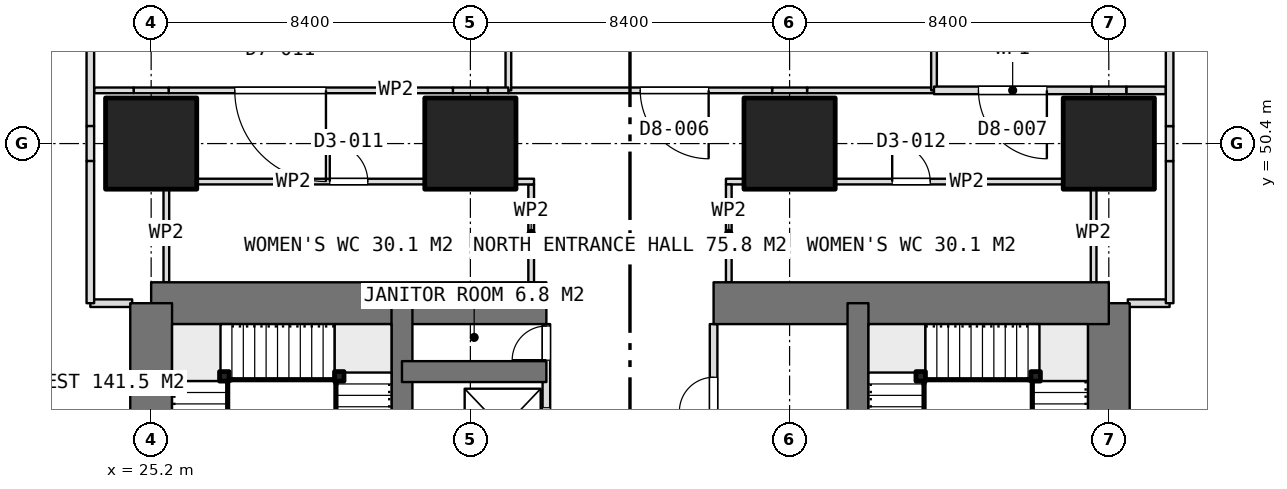
"""IFC4 building model, lengths in metres.
Left out: names, types, materials, properties, quantities, classifications, styles, units other than length and angle.
Written with IfcOpenShell. Run it as: python <this file> out.ifc"""

import sys

from ifc_helpers import new_model, si_unit, direction, frame, frame_2d, origin, origin_2d, place, context, subcontext, project, spatial, rectangle, extrude, element, fill, save


model = new_model("IFC4")
c1 = context("Model", 3, precision=1e-05, world=origin(), true_north=direction((0.0, 1.0)))
c2 = subcontext(c1, "Body", "Model", "MODEL_VIEW")
j1 = project(units=[si_unit("LENGTHUNIT", "METRE"), si_unit("PLANEANGLEUNIT", "RADIAN")], contexts=[c1])
p1 = place(None, origin())
s1 = spatial("IfcSite", under=j1, at=p1, CompositionType="ELEMENT")
p2 = place(p1, origin())
s2 = spatial("IfcBuilding", under=s1, at=p2, CompositionType="ELEMENT")
p3 = place(p2, origin())
s3 = spatial("IfcBuildingStorey", under=s2, at=p3, CompositionType="ELEMENT", Elevation=0.0)
p4 = place(p3, frame((25.2, 46.2, 0.0), z_axis=(0.0, 0.0, 1.0), x_axis=(1.0, 0.0, 0.0)))
e1 = element("IfcWall", 1, at=p4, inside=s3, PredefinedType="SHEAR", context=c2, shape_type="SweptSolid", body=[
    extrude(rectangle(XDim=10.4, YDim=1.1, at=frame_2d((5.2, 0.0))), origin(), (0.0, 0.0, 1.0), 5.4),
])
p5 = place(p3, frame((40.0, 46.2, 0.0), z_axis=(0.0, 0.0, 1.0), x_axis=(1.0, 0.0, 0.0)))
e2 = element("IfcWall", 2, at=p5, inside=s3, PredefinedType="SHEAR", context=c2, shape_type="SweptSolid", body=[
    extrude(rectangle(XDim=10.4, YDim=1.1, at=frame_2d((5.2, 0.0))), origin(), (0.0, 0.0, 1.0), 5.4),
])
p6 = place(p3, frame((25.2, 21.0, 0.0), z_axis=(0.0, 0.0, 1.0), x_axis=(0.0, 1.0, 0.0)))
e3 = element("IfcWall", 3, at=p6, inside=s3, PredefinedType="SHEAR", context=c2, shape_type="SweptSolid", body=[
    extrude(rectangle(XDim=25.2, YDim=1.1, at=frame_2d((12.6, 0.0))), origin(), (0.0, 0.0, 1.0), 5.4),
])
p7 = place(p6, frame((7.8, 0.0, 0.0)))
e4 = element("IfcOpeningElement", 4, at=p7, cuts=e3, PredefinedType="OPENING", context=c2, shape_type="SweptSolid", body=[
    extrude(rectangle(XDim=1.2, YDim=2.1, at=frame_2d((0.6, 1.05))), frame((0.0, 0.56, 0.0), z_axis=(0.0, -1.0, 0.0), x_axis=(1.0, 0.0, 0.0)), (0.0, 0.0, 1.0), 1.12),
])
p8 = place(p6, frame((14.25, 0.0, 0.0)))
e5 = element("IfcOpeningElement", 5, at=p8, cuts=e3, PredefinedType="OPENING", context=c2, shape_type="SweptSolid", body=[
    extrude(rectangle(XDim=0.9, YDim=2.1, at=frame_2d((0.45, 1.05))), frame((0.0, 0.56, 0.0), z_axis=(0.0, -1.0, 0.0), x_axis=(1.0, 0.0, 0.0)), (0.0, 0.0, 1.0), 1.12),
])
p9 = place(p6, frame((16.85, 0.0, 0.0)))
e6 = element("IfcOpeningElement", 6, at=p9, cuts=e3, PredefinedType="OPENING", context=c2, shape_type="SweptSolid", body=[
    extrude(rectangle(XDim=0.9, YDim=2.1, at=frame_2d((0.45, 1.05))), frame((0.0, 0.56, 0.0), z_axis=(0.0, -1.0, 0.0), x_axis=(1.0, 0.0, 0.0)), (0.0, 0.0, 1.0), 1.12),
])
p10 = place(p6, frame((19.075, 0.0, 0.0)))
e7 = element("IfcOpeningElement", 7, at=p10, cuts=e3, PredefinedType="OPENING", context=c2, shape_type="SweptSolid", body=[
    extrude(rectangle(XDim=1.2, YDim=2.1, at=frame_2d((0.6, 1.05))), frame((0.0, 0.56, 0.0), z_axis=(0.0, -1.0, 0.0), x_axis=(1.0, 0.0, 0.0)), (0.0, 0.0, 1.0), 1.12),
])
p11 = place(p3, frame((50.4, 21.0, 0.0), z_axis=(0.0, 0.0, 1.0), x_axis=(0.0, 1.0, 0.0)))
e8 = element("IfcWall", 8, at=p11, inside=s3, PredefinedType="SHEAR", context=c2, shape_type="SweptSolid", body=[
    extrude(rectangle(XDim=25.2, YDim=1.1, at=frame_2d((12.6, 0.0))), origin(), (0.0, 0.0, 1.0), 5.4),
])
p12 = place(p11, frame((16.2, 0.0, 0.0)))
e9 = element("IfcOpeningElement", 9, at=p12, cuts=e8, PredefinedType="OPENING", context=c2, shape_type="SweptSolid", body=[
    extrude(rectangle(XDim=1.2, YDim=2.1, at=frame_2d((0.6, 1.05))), frame((0.0, 0.56, 0.0), z_axis=(0.0, -1.0, 0.0), x_axis=(1.0, 0.0, 0.0)), (0.0, 0.0, 1.0), 1.12),
])
p13 = place(p11, frame((10.05, 0.0, 0.0)))
e10 = element("IfcOpeningElement", 10, at=p13, cuts=e8, PredefinedType="OPENING", context=c2, shape_type="SweptSolid", body=[
    extrude(rectangle(XDim=0.9, YDim=2.1, at=frame_2d((0.45, 1.05))), frame((0.0, 0.56, 0.0), z_axis=(0.0, -1.0, 0.0), x_axis=(1.0, 0.0, 0.0)), (0.0, 0.0, 1.0), 1.12),
])
p14 = place(p11, frame((7.45, 0.0, 0.0)))
e11 = element("IfcOpeningElement", 11, at=p14, cuts=e8, PredefinedType="OPENING", context=c2, shape_type="SweptSolid", body=[
    extrude(rectangle(XDim=0.9, YDim=2.1, at=frame_2d((0.45, 1.05))), frame((0.0, 0.56, 0.0), z_axis=(0.0, -1.0, 0.0), x_axis=(1.0, 0.0, 0.0)), (0.0, 0.0, 1.0), 1.12),
])
p15 = place(p11, frame((0.75, 0.0, 0.0)))
e12 = element("IfcOpeningElement", 12, at=p15, cuts=e8, PredefinedType="OPENING", context=c2, shape_type="SweptSolid", body=[
    extrude(rectangle(XDim=1.2, YDim=2.1, at=frame_2d((0.6, 1.05))), frame((0.0, 0.56, 0.0), z_axis=(0.0, -1.0, 0.0), x_axis=(1.0, 0.0, 0.0)), (0.0, 0.0, 1.0), 1.12),
])
for number, where, z_axis, x_axis in (
    (13, (31.8, 21.0, 0.0), (0.0, 0.0, 1.0), (0.0, 1.0, 0.0)),
    (14, (43.8, 21.0, 0.0), (0.0, 0.0, 1.0), (0.0, 1.0, 0.0)),
):
    element("IfcWall", number, at=place(p3, frame(where, z_axis=z_axis, x_axis=x_axis)), inside=s3, PredefinedType="SHEAR", context=c2, shape_type="SweptSolid", body=[
        extrude(rectangle(XDim=25.2, YDim=0.55, at=frame_2d((12.6, 0.0))), origin(), (0.0, 0.0, 1.0), 5.4),
    ])
p16 = place(p3, frame((31.8, 44.4, 0.0), z_axis=(0.0, 0.0, 1.0), x_axis=(1.0, 0.0, 0.0)))
e15 = element("IfcWall", 15, at=p16, inside=s3, PredefinedType="SHEAR", context=c2, shape_type="SweptSolid", body=[
    extrude(rectangle(XDim=3.8, YDim=0.55, at=frame_2d((1.9, 0.0))), origin(), (0.0, 0.0, 1.0), 5.4),
])
for number, where, z_axis, x_axis in (
    (16, (25.2, 50.4, 0.0), (0.0, 0.0, 1.0), (1.0, 0.0, 0.0)),
    (17, (33.6, 50.4, 0.0), (0.0, 0.0, 1.0), (1.0, 0.0, 0.0)),
    (18, (42.0, 50.4, 0.0), (0.0, 0.0, 1.0), (1.0, 0.0, 0.0)),
    (19, (50.4, 50.4, 0.0), (0.0, 0.0, 1.0), (1.0, 0.0, 0.0)),
):
    element("IfcColumn", number, at=place(p3, frame(where, z_axis=z_axis, x_axis=x_axis)), inside=s3, PredefinedType="COLUMN", context=c2, shape_type="SweptSolid", body=[
        extrude(rectangle(XDim=2.4, YDim=2.4, at=origin_2d()), origin(), (0.0, 0.0, 1.0), 5.4),
    ])
p17 = place(p3, frame((40.0, 41.675, 0.0), z_axis=(0.0, 0.0, 1.0), x_axis=(0.0, 1.0, 0.0)))
e20 = element("IfcWall", 20, at=p17, inside=s3, PredefinedType="PARTITIONING", context=c2, shape_type="SweptSolid", body=[
    extrude(rectangle(XDim=3.975, YDim=0.2, at=frame_2d((1.987, 0.0))), origin(), (0.0, 0.0, 1.0), 5.1),
])
p18 = place(p17, frame((1.675, 0.0, 0.0)))
e21 = element("IfcOpeningElement", 21, at=p18, cuts=e20, PredefinedType="OPENING", context=c2, shape_type="SweptSolid", body=[
    extrude(rectangle(XDim=0.9, YDim=2.1, at=frame_2d((0.45, 1.05))), frame((0.0, 0.11, 0.0), z_axis=(0.0, -1.0, 0.0), x_axis=(1.0, 0.0, 0.0)), (0.0, 0.0, 1.0), 0.22),
])
p19 = place(p3, frame((35.6, 41.675, 0.0), z_axis=(0.0, 0.0, 1.0), x_axis=(0.0, 1.0, 0.0)))
e22 = element("IfcWall", 22, at=p19, inside=s3, PredefinedType="PARTITIONING", context=c2, shape_type="SweptSolid", body=[
    extrude(rectangle(XDim=3.975, YDim=0.2, at=frame_2d((1.987, 0.0))), origin(), (0.0, 0.0, 1.0), 5.1),
])
p20 = place(p19, frame((3.025, 0.0, 0.0)))
e23 = element("IfcOpeningElement", 23, at=p20, cuts=e22, PredefinedType="OPENING", context=c2, shape_type="SweptSolid", body=[
    extrude(rectangle(XDim=0.9, YDim=2.1, at=frame_2d((0.45, 1.05))), frame((0.0, 0.11, 0.0), z_axis=(0.0, -1.0, 0.0), x_axis=(1.0, 0.0, 0.0)), (0.0, 0.0, 1.0), 0.22),
])
p21 = place(p19, frame((0.675, 0.0, 0.0)))
e24 = element("IfcOpeningElement", 24, at=p21, cuts=e22, PredefinedType="OPENING", context=c2, shape_type="SweptSolid", body=[
    extrude(rectangle(XDim=1.1, YDim=2.1, at=frame_2d((0.55, 1.05))), frame((0.0, 0.11, 0.0), z_axis=(0.0, -1.0, 0.0), x_axis=(1.0, 0.0, 0.0)), (0.0, 0.0, 1.0), 0.22),
])
p22 = place(p3, frame((40.325, 49.4, 0.0), z_axis=(0.0, 0.0, 1.0), x_axis=(1.0, 0.0, 0.0)))
e25 = element("IfcWall", 25, at=p22, inside=s3, PredefinedType="PARTITIONING", context=c2, shape_type="SweptSolid", body=[
    extrude(rectangle(XDim=9.75, YDim=0.15, at=frame_2d((4.875, 0.0))), origin(), (0.0, 0.0, 1.0), 5.1),
])
p23 = place(p22, frame((4.375, 0.0, 0.0)))
e26 = element("IfcOpeningElement", 26, at=p23, cuts=e25, PredefinedType="OPENING", context=c2, shape_type="SweptSolid", body=[
    extrude(rectangle(XDim=1.0, YDim=2.1, at=frame_2d((0.5, 1.05))), frame((0.0, 0.085, 0.0), z_axis=(0.0, -1.0, 0.0), x_axis=(1.0, 0.0, 0.0)), (0.0, 0.0, 1.0), 0.17),
])
for number, where, z_axis, x_axis in (
    (27, (40.4, 46.75, 0.0), (0.0, 0.0, 1.0), (0.0, 1.0, 0.0)),
    (28, (50.0, 46.75, 0.0), (0.0, 0.0, 1.0), (0.0, 1.0, 0.0)),
):
    element("IfcWall", number, at=place(p3, frame(where, z_axis=z_axis, x_axis=x_axis)), inside=s3, PredefinedType="PARTITIONING", context=c2, shape_type="SweptSolid", body=[
        extrude(rectangle(XDim=2.575, YDim=0.15, at=frame_2d((1.288, 0.0))), origin(), (0.0, 0.0, 1.0), 5.1),
    ])
p24 = place(p3, frame((25.525, 49.4, 0.0), z_axis=(0.0, 0.0, 1.0), x_axis=(1.0, 0.0, 0.0)))
e29 = element("IfcWall", 29, at=p24, inside=s3, PredefinedType="PARTITIONING", context=c2, shape_type="SweptSolid", body=[
    extrude(rectangle(XDim=9.75, YDim=0.15, at=frame_2d((4.875, 0.0))), origin(), (0.0, 0.0, 1.0), 5.1),
])
p25 = place(p24, frame((4.375, 0.0, 0.0)))
e30 = element("IfcOpeningElement", 30, at=p25, cuts=e29, PredefinedType="OPENING", context=c2, shape_type="SweptSolid", body=[
    extrude(rectangle(XDim=1.0, YDim=2.1, at=frame_2d((0.5, 1.05))), frame((0.0, 0.085, 0.0), z_axis=(0.0, -1.0, 0.0), x_axis=(1.0, 0.0, 0.0)), (0.0, 0.0, 1.0), 0.17),
])
for number, where, z_axis, x_axis in (
    (31, (25.6, 46.75, 0.0), (0.0, 0.0, 1.0), (0.0, 1.0, 0.0)),
    (32, (35.2, 46.75, 0.0), (0.0, 0.0, 1.0), (0.0, 1.0, 0.0)),
):
    element("IfcWall", number, at=place(p3, frame(where, z_axis=z_axis, x_axis=x_axis)), inside=s3, PredefinedType="PARTITIONING", context=c2, shape_type="SweptSolid", body=[
        extrude(rectangle(XDim=2.575, YDim=0.15, at=frame_2d((1.288, 0.0))), origin(), (0.0, 0.0, 1.0), 5.1),
    ])
p26 = place(p3, frame((23.6, 46.2, 0.0), z_axis=(0.0, 0.0, 1.0), x_axis=(1.0, 0.0, 0.0)))
e33 = element("IfcWall", 33, at=p26, inside=s3, PredefinedType="PARTITIONING", context=c2, shape_type="SweptSolid", body=[
    extrude(rectangle(XDim=1.1, YDim=0.2, at=frame_2d((0.55, 0.0))), origin(), (0.0, 0.0, 1.0), 5.1),
])
p27 = place(p3, frame((23.6, 58.34, 0.0), z_axis=(0.0, 0.0, 1.0), x_axis=(0.0, -1.0, 0.0)))
e34 = element("IfcWall", 34, at=p27, inside=s3, PredefinedType="PARTITIONING", context=c2, shape_type="SweptSolid", body=[
    extrude(rectangle(XDim=7.48, YDim=0.2, at=frame_2d((3.74, 0.0))), origin(), (0.0, 0.0, 1.0), 5.1),
])
p28 = place(p3, frame((23.6, 50.86, 0.0), z_axis=(0.0, 0.0, 1.0), x_axis=(0.0, -1.0, 0.0)))
e35 = element("IfcWall", 35, at=p28, inside=s3, PredefinedType="PARTITIONING", context=c2, shape_type="SweptSolid", body=[
    extrude(rectangle(XDim=0.92, YDim=0.2, at=frame_2d((0.46, 0.0))), origin(), (0.0, 0.0, 1.0), 3.3),
])
for number, where, z_axis, x_axis in (
    (36, (23.6, 49.94, 0.0), (0.0, 0.0, 1.0), (0.0, -1.0, 0.0)),
    (37, (52.0, 46.2, 0.0), (0.0, 0.0, 1.0), (0.0, 1.0, 0.0)),
):
    element("IfcWall", number, at=place(p3, frame(where, z_axis=z_axis, x_axis=x_axis)), inside=s3, PredefinedType="PARTITIONING", context=c2, shape_type="SweptSolid", body=[
        extrude(rectangle(XDim=3.74, YDim=0.2, at=frame_2d((1.87, 0.0))), origin(), (0.0, 0.0, 1.0), 5.1),
    ])
p29 = place(p3, frame((52.0, 49.94, 0.0), z_axis=(0.0, 0.0, 1.0), x_axis=(0.0, 1.0, 0.0)))
e38 = element("IfcWall", 38, at=p29, inside=s3, PredefinedType="PARTITIONING", context=c2, shape_type="SweptSolid", body=[
    extrude(rectangle(XDim=0.92, YDim=0.2, at=frame_2d((0.46, 0.0))), origin(), (0.0, 0.0, 1.0), 3.3),
])
p30 = place(p3, frame((52.0, 50.86, 0.0), z_axis=(0.0, 0.0, 1.0), x_axis=(0.0, 1.0, 0.0)))
e39 = element("IfcWall", 39, at=p30, inside=s3, PredefinedType="PARTITIONING", context=c2, shape_type="SweptSolid", body=[
    extrude(rectangle(XDim=7.48, YDim=0.2, at=frame_2d((3.74, 0.0))), origin(), (0.0, 0.0, 1.0), 5.1),
])
p31 = place(p3, frame((50.9, 46.2, 0.0), z_axis=(0.0, 0.0, 1.0), x_axis=(1.0, 0.0, 0.0)))
e40 = element("IfcWall", 40, at=p31, inside=s3, PredefinedType="PARTITIONING", context=c2, shape_type="SweptSolid", body=[
    extrude(rectangle(XDim=1.1, YDim=0.2, at=frame_2d((0.55, 0.0))), origin(), (0.0, 0.0, 1.0), 5.1),
])
p32 = place(p3, frame((45.8, 51.8, 0.0), z_axis=(0.0, 0.0, 1.0), x_axis=(-1.0, 0.0, 0.0)))
e41 = element("IfcWall", 41, at=p32, inside=s3, PredefinedType="PARTITIONING", context=c2, shape_type="SweptSolid", body=[
    extrude(rectangle(XDim=3.34, YDim=0.15, at=frame_2d((1.67, 0.0))), origin(), (0.0, 0.0, 1.0), 5.1),
])
p33 = place(p3, frame((42.46, 51.8, 0.0), z_axis=(0.0, 0.0, 1.0), x_axis=(-1.0, 0.0, 0.0)))
e42 = element("IfcWall", 42, at=p33, inside=s3, PredefinedType="PARTITIONING", context=c2, shape_type="SweptSolid", body=[
    extrude(rectangle(XDim=0.92, YDim=0.15, at=frame_2d((0.46, 0.0))), origin(), (0.0, 0.0, 1.0), 3.3),
])
p34 = place(p3, frame((41.54, 51.8, 0.0), z_axis=(0.0, 0.0, 1.0), x_axis=(-1.0, 0.0, 0.0)))
e43 = element("IfcWall", 43, at=p34, inside=s3, PredefinedType="PARTITIONING", context=c2, shape_type="SweptSolid", body=[
    extrude(rectangle(XDim=6.94, YDim=0.15, at=frame_2d((3.47, 0.0))), origin(), (0.0, 0.0, 1.0), 5.1),
])
p35 = place(p34, frame((1.67, 0.0, 0.0)))
e44 = element("IfcOpeningElement", 44, at=p35, cuts=e43, PredefinedType="OPENING", context=c2, shape_type="SweptSolid", body=[
    extrude(rectangle(XDim=1.8, YDim=2.1, at=frame_2d((0.9, 1.05))), frame((0.0, 0.085, 0.0), z_axis=(0.0, -1.0, 0.0), x_axis=(1.0, 0.0, 0.0)), (0.0, 0.0, 1.0), 0.17),
])
p36 = place(p3, frame((34.6, 51.8, 0.0), z_axis=(0.0, 0.0, 1.0), x_axis=(0.0, 1.0, 0.0)))
e45 = element("IfcWall", 45, at=p36, inside=s3, PredefinedType="PARTITIONING", context=c2, shape_type="SweptSolid", body=[
    extrude(rectangle(XDim=5.78, YDim=0.15, at=frame_2d((2.89, 0.0))), origin(), (0.0, 0.0, 1.0), 5.1),
])
p37 = place(p3, frame((45.8, 58.34, 0.0), z_axis=(0.0, 0.0, 1.0), x_axis=(0.0, -1.0, 0.0)))
e46 = element("IfcWall", 46, at=p37, inside=s3, PredefinedType="PARTITIONING", context=c2, shape_type="SweptSolid", body=[
    extrude(rectangle(XDim=6.54, YDim=0.15, at=frame_2d((3.27, 0.0))), origin(), (0.0, 0.0, 1.0), 5.1),
])
p38 = place(p3, frame((34.6, 51.8, 0.0), z_axis=(0.0, 0.0, 1.0), x_axis=(-1.0, 0.0, 0.0)))
e47 = element("IfcWall", 47, at=p38, inside=s3, PredefinedType="PARTITIONING", context=c2, shape_type="SweptSolid", body=[
    extrude(rectangle(XDim=0.54, YDim=0.15, at=frame_2d((0.27, 0.0))), origin(), (0.0, 0.0, 1.0), 5.1),
])
p39 = place(p3, frame((34.06, 51.8, 0.0), z_axis=(0.0, 0.0, 1.0), x_axis=(-1.0, 0.0, 0.0)))
e48 = element("IfcWall", 48, at=p39, inside=s3, PredefinedType="PARTITIONING", context=c2, shape_type="SweptSolid", body=[
    extrude(rectangle(XDim=0.92, YDim=0.15, at=frame_2d((0.46, 0.0))), origin(), (0.0, 0.0, 1.0), 3.3),
])
p40 = place(p3, frame((33.14, 51.8, 0.0), z_axis=(0.0, 0.0, 1.0), x_axis=(-1.0, 0.0, 0.0)))
e49 = element("IfcWall", 49, at=p40, inside=s3, PredefinedType="PARTITIONING", context=c2, shape_type="SweptSolid", body=[
    extrude(rectangle(XDim=7.48, YDim=0.15, at=frame_2d((3.74, 0.0))), origin(), (0.0, 0.0, 1.0), 5.1),
])
p41 = place(p40, frame((3.34, 0.0, 0.0)))
e50 = element("IfcOpeningElement", 50, at=p41, cuts=e49, PredefinedType="OPENING", context=c2, shape_type="SweptSolid", body=[
    extrude(rectangle(XDim=2.4, YDim=2.4, at=frame_2d((1.2, 1.2))), frame((0.0, 0.085, 0.0), z_axis=(0.0, -1.0, 0.0), x_axis=(1.0, 0.0, 0.0)), (0.0, 0.0, 1.0), 0.17),
])
p42 = place(p3, frame((25.66, 51.8, 0.0), z_axis=(0.0, 0.0, 1.0), x_axis=(-1.0, 0.0, 0.0)))
e51 = element("IfcWall", 51, at=p42, inside=s3, PredefinedType="PARTITIONING", context=c2, shape_type="SweptSolid", body=[
    extrude(rectangle(XDim=0.92, YDim=0.15, at=frame_2d((0.46, 0.0))), origin(), (0.0, 0.0, 1.0), 3.3),
])
p43 = place(p3, frame((24.74, 51.8, 0.0), z_axis=(0.0, 0.0, 1.0), x_axis=(-1.0, 0.0, 0.0)))
e52 = element("IfcWall", 52, at=p43, inside=s3, PredefinedType="PARTITIONING", context=c2, shape_type="SweptSolid", body=[
    extrude(rectangle(XDim=1.04, YDim=0.15, at=frame_2d((0.52, 0.0))), origin(), (0.0, 0.0, 1.0), 5.1),
])
p44 = place(p3, frame((51.9, 51.8, 0.0), z_axis=(0.0, 0.0, 1.0), x_axis=(-1.0, 0.0, 0.0)))
e53 = element("IfcWall", 53, at=p44, inside=s3, PredefinedType="PARTITIONING", context=c2, shape_type="SweptSolid", body=[
    extrude(rectangle(XDim=1.04, YDim=0.2, at=frame_2d((0.52, 0.0))), origin(), (0.0, 0.0, 1.0), 5.1),
])
p45 = place(p3, frame((50.86, 51.8, 0.0), z_axis=(0.0, 0.0, 1.0), x_axis=(-1.0, 0.0, 0.0)))
e54 = element("IfcWall", 54, at=p45, inside=s3, PredefinedType="PARTITIONING", context=c2, shape_type="SweptSolid", body=[
    extrude(rectangle(XDim=0.92, YDim=0.2, at=frame_2d((0.46, 0.0))), origin(), (0.0, 0.0, 1.0), 3.3),
])
p46 = place(p3, frame((49.94, 51.8, 0.0), z_axis=(0.0, 0.0, 1.0), x_axis=(-1.0, 0.0, 0.0)))
e55 = element("IfcWall", 55, at=p46, inside=s3, PredefinedType="PARTITIONING", context=c2, shape_type="SweptSolid", body=[
    extrude(rectangle(XDim=4.14, YDim=0.2, at=frame_2d((2.07, 0.0))), origin(), (0.0, 0.0, 1.0), 5.1),
])
p47 = place(p46, frame((1.17, 0.0, 0.0)))
e56 = element("IfcOpeningElement", 56, at=p47, cuts=e55, PredefinedType="OPENING", context=c2, shape_type="SweptSolid", body=[
    extrude(rectangle(XDim=1.8, YDim=2.1, at=frame_2d((0.9, 1.05))), frame((0.0, 0.11, 0.0), z_axis=(0.0, -1.0, 0.0), x_axis=(1.0, 0.0, 0.0)), (0.0, 0.0, 1.0), 0.22),
])
for number, where, z_axis, x_axis in (
    (57, (45.45, 44.275, 0.0), (0.0, 0.0, 1.0), (1.0, 0.0, 0.0)),
    (58, (48.475, 44.275, 0.0), (0.0, 0.0, 1.0), (1.0, 0.0, 0.0)),
    (59, (30.15, 44.275, 0.0), (0.0, 0.0, 1.0), (1.0, 0.0, 0.0)),
    (60, (27.125, 44.275, 0.0), (0.0, 0.0, 1.0), (1.0, 0.0, 0.0)),
):
    element("IfcColumn", number, at=place(p3, frame(where, z_axis=z_axis, x_axis=x_axis)), inside=s3, PredefinedType="COLUMN", context=c2, shape_type="SweptSolid", body=[
        extrude(rectangle(XDim=0.25, YDim=0.25, at=origin_2d()), origin(), (0.0, 0.0, 1.0), 5.4),
    ])
p48 = place(p18, origin())
e61 = element("IfcDoor", 61, at=p48, inside=s3, OperationType="SINGLE_SWING_LEFT", PredefinedType="DOOR", context=c2, shape_type="SweptSolid", body=[
    extrude(rectangle(XDim=0.9, YDim=2.1, at=frame_2d((0.45, 1.05))), frame((0.0, 0.025, 0.0), z_axis=(0.0, -1.0, 0.0), x_axis=(1.0, 0.0, 0.0)), (0.0, 0.0, 1.0), 0.05),
])
fill(e21, e61)
p49 = place(p20, origin())
e62 = element("IfcDoor", 62, at=p49, inside=s3, OperationType="SINGLE_SWING_LEFT", PredefinedType="DOOR", context=c2, shape_type="SweptSolid", body=[
    extrude(rectangle(XDim=0.9, YDim=2.1, at=frame_2d((0.45, 1.05))), frame((0.0, 0.025, 0.0), z_axis=(0.0, -1.0, 0.0), x_axis=(1.0, 0.0, 0.0)), (0.0, 0.0, 1.0), 0.05),
])
fill(e23, e62)
p50 = place(p21, origin())
e63 = element("IfcDoor", 63, at=p50, inside=s3, OperationType="SLIDING_TO_LEFT", PredefinedType="USERDEFINED", context=c2, shape_type="SweptSolid", body=[
    extrude(rectangle(XDim=1.1, YDim=2.1, at=frame_2d((0.55, 1.05))), frame((0.0, 0.025, 0.0), z_axis=(0.0, -1.0, 0.0), x_axis=(1.0, 0.0, 0.0)), (0.0, 0.0, 1.0), 0.05),
])
fill(e24, e63)
p51 = place(p23, origin())
e64 = element("IfcDoor", 64, at=p51, inside=s3, OperationType="SINGLE_SWING_LEFT", PredefinedType="DOOR", context=c2, shape_type="SweptSolid", body=[
    extrude(rectangle(XDim=1.0, YDim=2.1, at=frame_2d((0.5, 1.05))), frame((0.0, 0.025, 0.0), z_axis=(0.0, -1.0, 0.0), x_axis=(1.0, 0.0, 0.0)), (0.0, 0.0, 1.0), 0.05),
])
fill(e26, e64)
p52 = place(p25, origin())
e65 = element("IfcDoor", 65, at=p52, inside=s3, OperationType="SINGLE_SWING_LEFT", PredefinedType="DOOR", context=c2, shape_type="SweptSolid", body=[
    extrude(rectangle(XDim=1.0, YDim=2.1, at=frame_2d((0.5, 1.05))), frame((0.0, 0.025, 0.0), z_axis=(0.0, -1.0, 0.0), x_axis=(1.0, 0.0, 0.0)), (0.0, 0.0, 1.0), 0.05),
])
fill(e30, e65)
p53 = place(p35, origin())
e66 = element("IfcDoor", 66, at=p53, inside=s3, OperationType="DOUBLE_DOOR_SINGLE_SWING", PredefinedType="DOOR", context=c2, shape_type="SweptSolid", body=[
    extrude(rectangle(XDim=1.8, YDim=2.1, at=frame_2d((0.9, 1.05))), frame((0.0, 0.025, 0.0), z_axis=(0.0, -1.0, 0.0), x_axis=(1.0, 0.0, 0.0)), (0.0, 0.0, 1.0), 0.05),
])
fill(e44, e66)
p54 = place(p41, origin())
e67 = element("IfcDoor", 67, at=p54, inside=s3, OperationType="DOUBLE_DOOR_SINGLE_SWING", PredefinedType="DOOR", context=c2, shape_type="SweptSolid", body=[
    extrude(rectangle(XDim=2.4, YDim=2.4, at=frame_2d((1.2, 1.2))), frame((0.0, 0.025, 0.0), z_axis=(0.0, -1.0, 0.0), x_axis=(1.0, 0.0, 0.0)), (0.0, 0.0, 1.0), 0.05),
])
fill(e50, e67)
p55 = place(p47, origin())
e68 = element("IfcDoor", 68, at=p55, inside=s3, OperationType="DOUBLE_DOOR_SINGLE_SWING", PredefinedType="DOOR", context=c2, shape_type="SweptSolid", body=[
    extrude(rectangle(XDim=1.8, YDim=2.1, at=frame_2d((0.9, 1.05))), frame((0.0, 0.025, 0.0), z_axis=(0.0, -1.0, 0.0), x_axis=(1.0, 0.0, 0.0)), (0.0, 0.0, 1.0), 0.05),
])
fill(e56, e68)
save(model, sys.argv[1])
